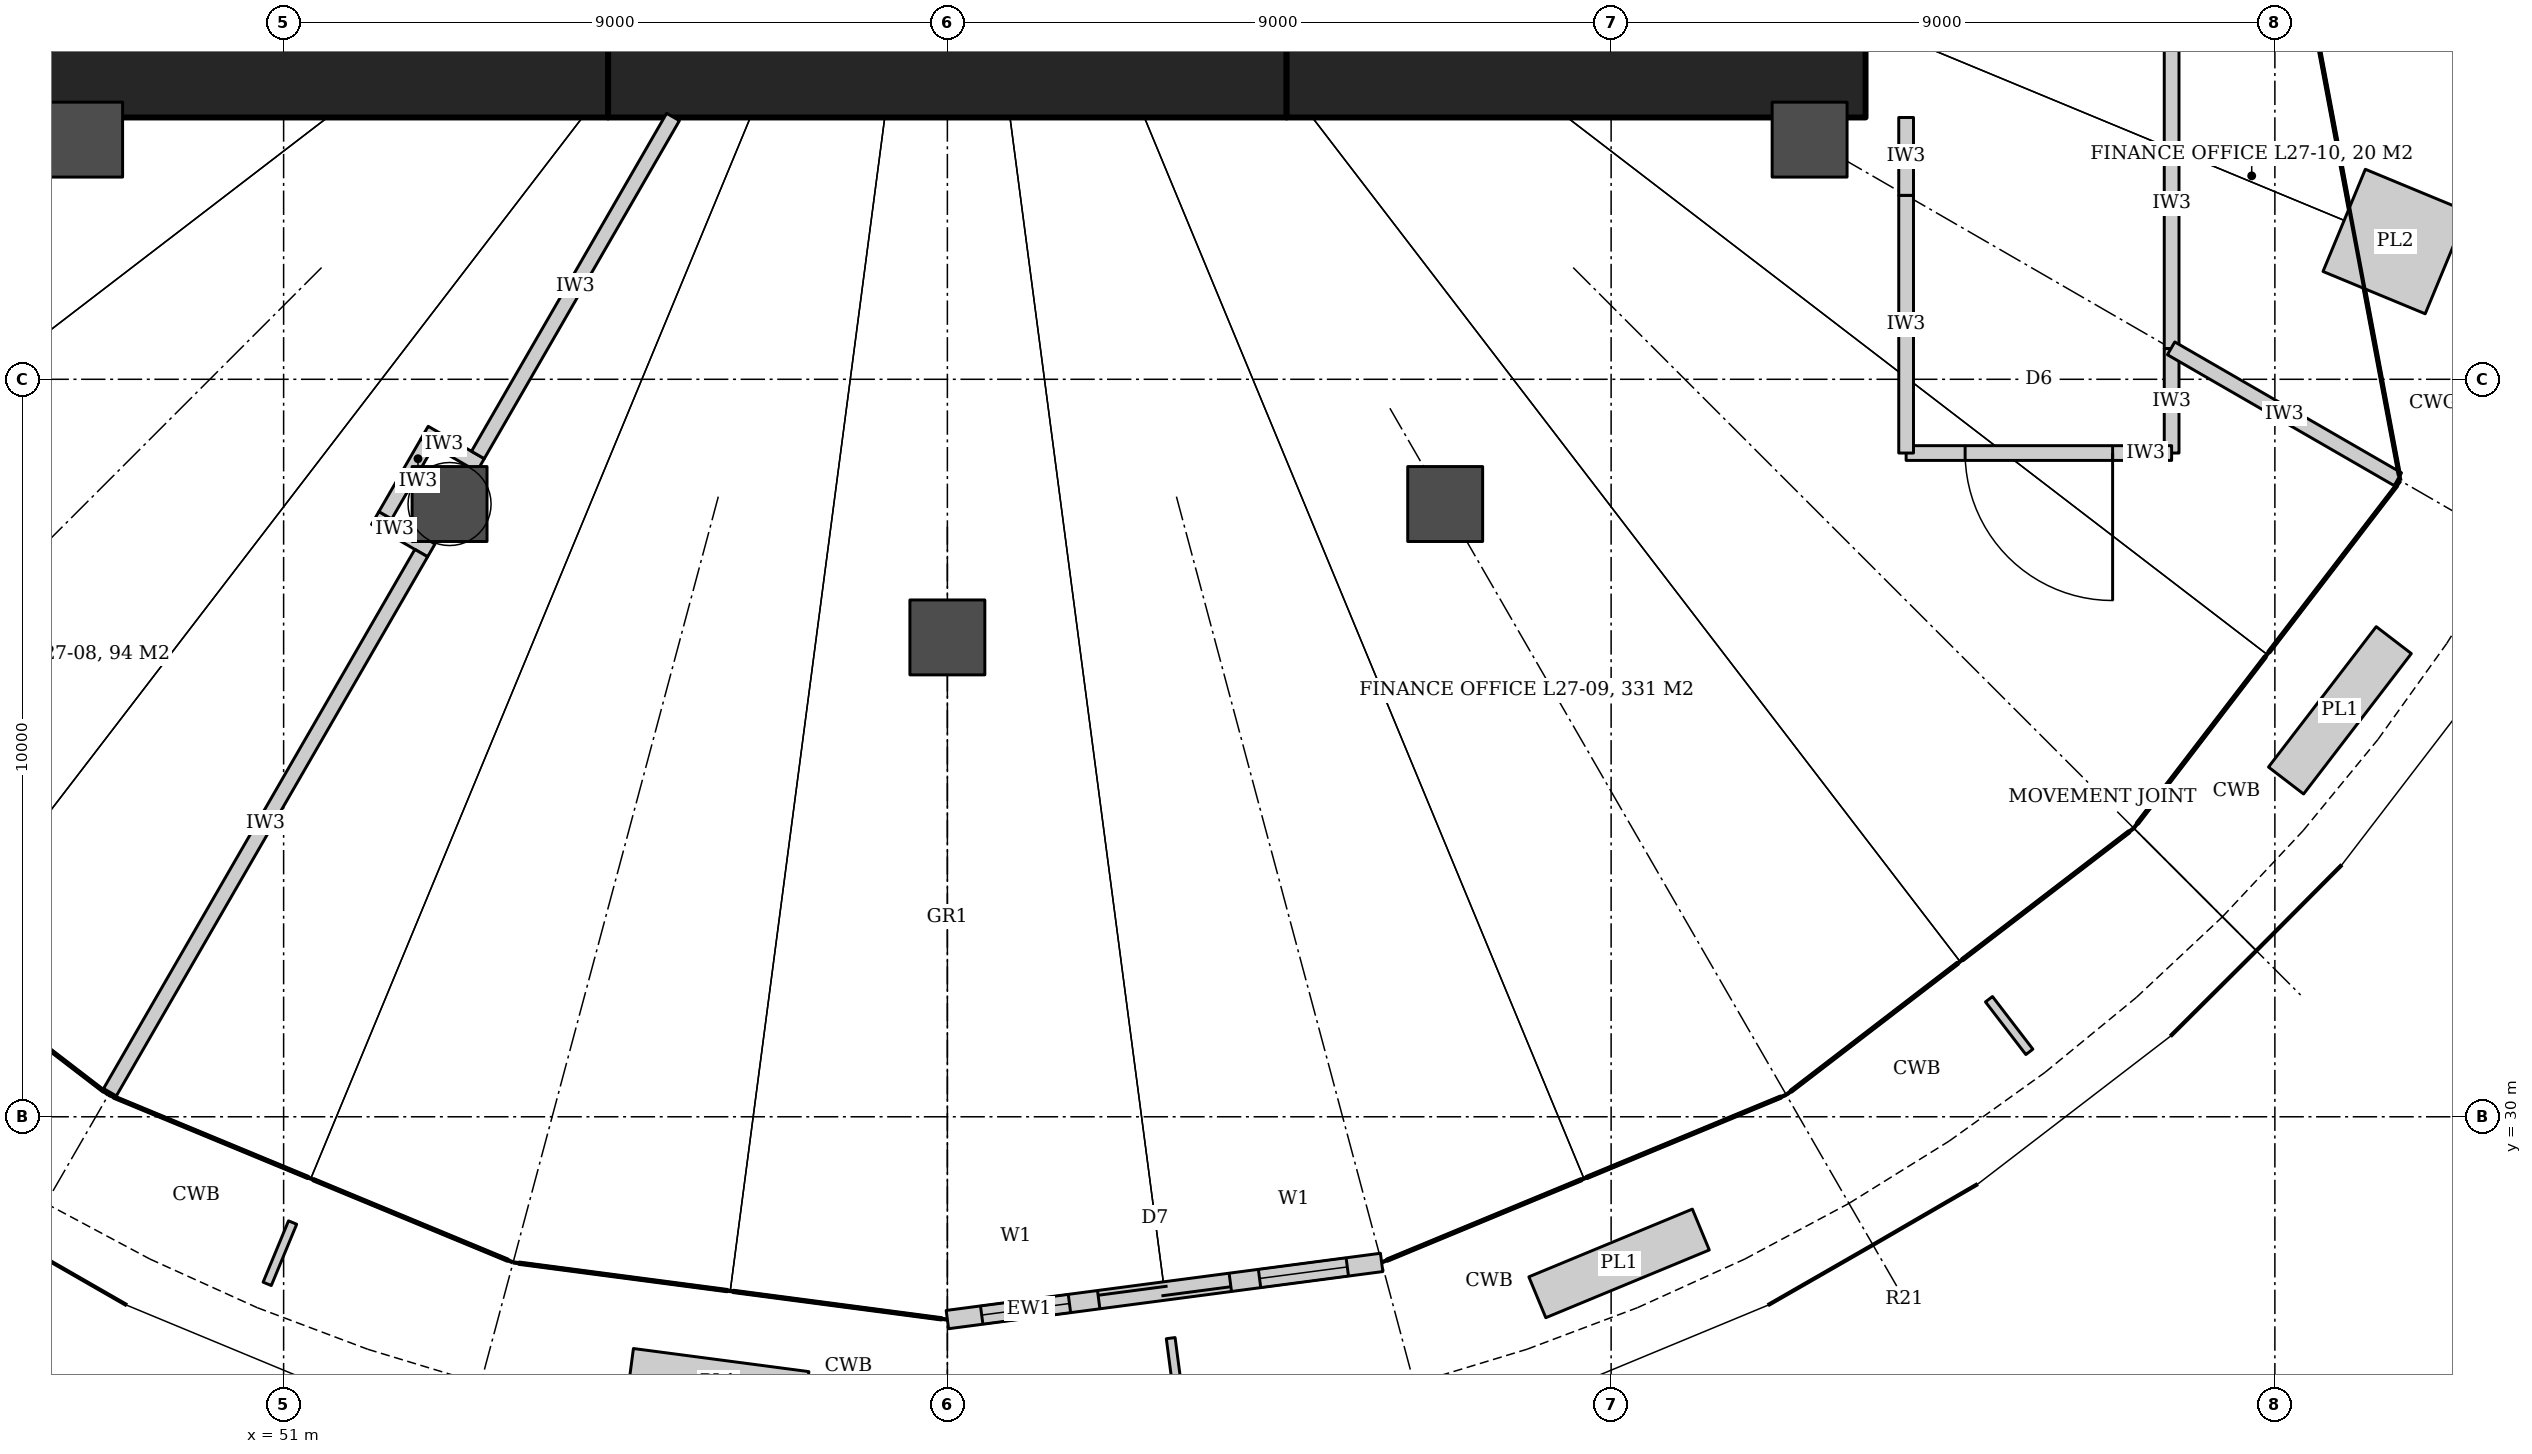
"""IFC4 building model, lengths in metres.
Left out: names, types, materials, properties, quantities, classifications, styles, units other than length and angle.
Written with IfcOpenShell. Run it as: python <this file> out.ifc"""

import sys

from ifc_helpers import new_model, si_unit, direction, frame, frame_2d, origin, origin_2d, place, context, subcontext, project, spatial, rectangle, hollow_circle, extrude, element, fill, save


model = new_model("IFC4")
c1 = context("Model", 3, precision=1e-05, world=origin(), true_north=direction((0.0, 1.0)))
c2 = subcontext(c1, "Body", "Model", "MODEL_VIEW")
j1 = project(units=[si_unit("LENGTHUNIT", "METRE"), si_unit("PLANEANGLEUNIT", "RADIAN")], contexts=[c1])
p1 = place(None, origin())
s1 = spatial("IfcSite", under=j1, at=p1, CompositionType="ELEMENT")
p2 = place(p1, origin())
s2 = spatial("IfcBuilding", under=s1, at=p2, CompositionType="ELEMENT")
p3 = place(p2, frame((0.0, 0.0, 122.6)))
s3 = spatial("IfcBuildingStorey", under=s2, at=p3, CompositionType="ELEMENT", Elevation=122.6)
p4 = place(p3, frame((47.55, 44.45, 0.0), z_axis=(0.0, 0.0, 1.0), x_axis=(1.0, 0.0, 0.0)))
e1 = element("IfcWall", 1, at=p4, inside=s3, PredefinedType="SHEAR", context=c2, shape_type="SweptSolid", body=[
    extrude(rectangle(XDim=7.85, YDim=1.8, at=frame_2d((3.925, 0.0))), origin(), (0.0, 0.0, 1.0), 4.2),
])
p5 = place(p3, frame((55.4, 44.45, 0.0), z_axis=(0.0, 0.0, 1.0), x_axis=(1.0, 0.0, 0.0)))
e2 = element("IfcWall", 2, at=p5, inside=s3, PredefinedType="SHEAR", context=c2, shape_type="SweptSolid", body=[
    extrude(rectangle(XDim=9.2, YDim=1.8, at=frame_2d((4.6, 0.0))), origin(), (0.0, 0.0, 1.0), 4.2),
])
p6 = place(p3, frame((64.6, 44.45, 0.0), z_axis=(0.0, 0.0, 1.0), x_axis=(1.0, 0.0, 0.0)))
e3 = element("IfcWall", 3, at=p6, inside=s3, PredefinedType="SHEAR", context=c2, shape_type="SweptSolid", body=[
    extrude(rectangle(XDim=7.85, YDim=1.8, at=frame_2d((3.925, 0.0))), origin(), (0.0, 0.0, 1.0), 4.2),
])
for number, where, z_axis, x_axis in (
    (4, (48.309, 43.25, 0.0), (0.0, 0.0, 1.0), (1.0, 0.0, 0.0)),
    (5, (53.25, 38.309, 0.0), (0.0, 0.0, 1.0), (1.0, 0.0, 0.0)),
    (6, (60.0, 36.5, 0.0), (0.0, 0.0, 1.0), (1.0, 0.0, 0.0)),
    (7, (66.75, 38.309, 0.0), (0.0, 0.0, 1.0), (1.0, 0.0, 0.0)),
    (8, (71.691, 43.25, 0.0), (0.0, 0.0, 1.0), (1.0, 0.0, 0.0)),
):
    element("IfcColumn", number, at=place(p3, frame(where, z_axis=z_axis, x_axis=x_axis)), inside=s3, PredefinedType="COLUMN", context=c2, shape_type="SweptSolid", body=[
        extrude(hollow_circle(Radius=0.508, WallThickness=0.05, at=origin_2d()), origin(), (0.0, 0.0, 1.0), 4.2),
    ])
p7 = place(p3, frame((76.6, 50.0, 0.0), z_axis=(0.0, 0.0, 1.0), x_axis=(0.0, -1.0, 0.0)))
e9 = element("IfcWall", 9, at=p7, inside=s3, PredefinedType="PARTITIONING", context=c2, shape_type="SweptSolid", body=[
    extrude(rectangle(XDim=9.584, YDim=0.2, at=frame_2d((4.792, 0.0))), origin(), (0.0, 0.0, 1.0), 3.04),
])
p8 = place(p7, frame((4.292, 0.0, 0.0)))
e10 = element("IfcOpeningElement", 10, at=p8, cuts=e9, PredefinedType="OPENING", context=c2, shape_type="SweptSolid", body=[
    extrude(rectangle(XDim=1.0, YDim=2.1, at=frame_2d((0.5, 1.05))), frame((0.0, 0.11, 0.0), z_axis=(0.0, -1.0, 0.0), x_axis=(1.0, 0.0, 0.0)), (0.0, 0.0, 1.0), 0.22),
])
p9 = place(p3, frame((76.6, 40.416, 0.0), z_axis=(0.0, 0.0, 1.0), x_axis=(0.0, -1.0, 0.0)))
e11 = element("IfcWall", 11, at=p9, inside=s3, PredefinedType="PARTITIONING", context=c2, shape_type="SweptSolid", body=[
    extrude(rectangle(XDim=1.416, YDim=0.2, at=frame_2d((0.708, 0.0))), origin(), (0.0, 0.0, 1.0), 3.04),
])
p10 = place(p3, frame((76.6, 39.0, 0.0), z_axis=(0.0, 0.0, 1.0), x_axis=(-1.0, 0.0, 0.0)))
e12 = element("IfcWall", 12, at=p10, inside=s3, PredefinedType="PARTITIONING", context=c2, shape_type="SweptSolid", body=[
    extrude(rectangle(XDim=3.6, YDim=0.2, at=frame_2d((1.8, 0.0))), origin(), (0.0, 0.0, 1.0), 3.04),
])
p11 = place(p10, frame((0.8, 0.0, 0.0)))
e13 = element("IfcOpeningElement", 13, at=p11, cuts=e12, PredefinedType="OPENING", context=c2, shape_type="SweptSolid", body=[
    extrude(rectangle(XDim=2.0, YDim=2.1, at=frame_2d((1.0, 1.05))), frame((0.0, 0.11, 0.0), z_axis=(0.0, -1.0, 0.0), x_axis=(1.0, 0.0, 0.0)), (0.0, 0.0, 1.0), 0.22),
])
p12 = place(p3, frame((73.0, 39.0, 0.0), z_axis=(0.0, 0.0, 1.0), x_axis=(0.0, 1.0, 0.0)))
e14 = element("IfcWall", 14, at=p12, inside=s3, PredefinedType="PARTITIONING", context=c2, shape_type="SweptSolid", body=[
    extrude(rectangle(XDim=3.494, YDim=0.2, at=frame_2d((1.747, 0.0))), origin(), (0.0, 0.0, 1.0), 3.04),
])
p13 = place(p3, frame((73.0, 42.494, 0.0), z_axis=(0.0, 0.0, 1.0), x_axis=(0.0, 1.0, 0.0)))
e15 = element("IfcWall", 15, at=p13, inside=s3, PredefinedType="PARTITIONING", context=c2, shape_type="SweptSolid", body=[
    extrude(rectangle(XDim=1.056, YDim=0.2, at=frame_2d((0.528, 0.0))), origin(), (0.0, 0.0, 1.0), 3.04),
])
for number, where, z_axis, x_axis in (
    (16, (53.671, 38.837, 0.0), (0.0, 0.0, 1.0), (-0.866, 0.5, 0.0)),
    (17, (53.003, 37.68, 0.0), (0.0, 0.0, 1.0), (-0.866, 0.5, 0.0)),
):
    element("IfcWall", number, at=place(p3, frame(where, z_axis=z_axis, x_axis=x_axis)), inside=s3, PredefinedType="PARTITIONING", context=c2, shape_type="SweptSolid", body=[
        extrude(rectangle(XDim=0.878, YDim=0.2, at=frame_2d((0.439, 0.0))), origin(), (0.0, 0.0, 1.0), 3.02),
    ])
p14 = place(p3, frame((52.947, 39.14, 0.0), z_axis=(0.0, 0.0, 1.0), x_axis=(-0.499883687939, -0.866092546171, 0.0)))
e18 = element("IfcWall", 18, at=p14, inside=s3, PredefinedType="PARTITIONING", context=c2, shape_type="SweptSolid", body=[
    extrude(rectangle(XDim=1.136, YDim=0.2, at=frame_2d((0.568, 0.0))), origin(), (0.0, 0.0, 1.0), 3.02),
])
p15 = place(p3, frame((56.28, 43.557, 0.0), z_axis=(0.0, 0.0, 1.0), x_axis=(-0.49999933383, -0.866025788398, 0.0)))
e19 = element("IfcWall", 19, at=p15, inside=s3, PredefinedType="PARTITIONING", context=c2, shape_type="SweptSolid", body=[
    extrude(rectangle(XDim=5.292, YDim=0.2, at=frame_2d((2.646, 0.0))), origin(), (0.0, 0.0, 1.0), 3.04),
])
p16 = place(p3, frame((52.866, 37.644, 0.0), z_axis=(0.0, 0.0, 1.0), x_axis=(-0.49999281717, -0.866029550753, 0.0)))
e20 = element("IfcWall", 20, at=p16, inside=s3, PredefinedType="PARTITIONING", context=c2, shape_type="SweptSolid", body=[
    extrude(rectangle(XDim=8.442, YDim=0.2, at=frame_2d((4.221, 0.0))), origin(), (0.0, 0.0, 1.0), 3.04),
])
p17 = place(p3, frame((76.593, 40.42, 0.0), z_axis=(0.0, 0.0, 1.0), x_axis=(0.8660424351, -0.499970499736, 0.0)))
e21 = element("IfcWall", 21, at=p17, inside=s3, PredefinedType="PARTITIONING", context=c2, shape_type="SweptSolid", body=[
    extrude(rectangle(XDim=3.55, YDim=0.2, at=frame_2d((1.775, 0.0))), origin(), (0.0, 0.0, 1.0), 3.04),
])
p18 = place(p3, frame((60.0, 27.25, 0.0), z_axis=(0.0, 0.0, 1.0), x_axis=(0.991445898364, 0.130518315254, 0.0)))
e22 = element("IfcWall", 22, at=p18, inside=s3, PredefinedType="SOLIDWALL", context=c2, shape_type="SweptSolid", body=[
    extrude(rectangle(XDim=5.939, YDim=0.25, at=frame_2d((2.969, 0.0))), origin(), (0.0, 0.0, 1.0), 4.04),
])
p19 = place(p18, frame((2.07, 0.0, 0.0)))
e23 = element("IfcOpeningElement", 23, at=p19, cuts=e22, PredefinedType="OPENING", context=c2, shape_type="SweptSolid", body=[
    extrude(rectangle(XDim=1.8, YDim=2.4, at=frame_2d((0.9, 1.2))), frame((0.0, 0.135, 0.0), z_axis=(0.0, -1.0, 0.0), x_axis=(1.0, 0.0, 0.0)), (0.0, 0.0, 1.0), 0.27),
])
p20 = place(p18, frame((0.469, 0.0, 0.0)))
e24 = element("IfcOpeningElement", 24, at=p20, cuts=e22, PredefinedType="OPENING", context=c2, shape_type="SweptSolid", body=[
    extrude(rectangle(XDim=1.2, YDim=2.4, at=frame_2d((0.6, 1.2))), frame((0.0, 0.135, 0.0), z_axis=(0.0, -1.0, 0.0), x_axis=(1.0, 0.0, 0.0)), (0.0, 0.0, 1.0), 0.27),
])
p21 = place(p18, frame((4.27, 0.0, 0.0)))
e25 = element("IfcOpeningElement", 25, at=p21, cuts=e22, PredefinedType="OPENING", context=c2, shape_type="SweptSolid", body=[
    extrude(rectangle(XDim=1.2, YDim=2.4, at=frame_2d((0.6, 1.2))), frame((0.0, 0.135, 0.0), z_axis=(0.0, -1.0, 0.0), x_axis=(1.0, 0.0, 0.0)), (0.0, 0.0, 1.0), 0.27),
])
p22 = place(p11, origin())
e26 = element("IfcDoor", 26, at=p22, inside=s3, OperationType="DOUBLE_DOOR_DOUBLE_SWING", PredefinedType="DOOR", context=c2, shape_type="SweptSolid", body=[
    extrude(rectangle(XDim=2.0, YDim=2.1, at=frame_2d((1.0, 1.05))), frame((0.0, 0.025, 0.0), z_axis=(0.0, -1.0, 0.0), x_axis=(1.0, 0.0, 0.0)), (0.0, 0.0, 1.0), 0.05),
])
fill(e13, e26)
p23 = place(p19, origin())
e27 = element("IfcDoor", 27, at=p23, inside=s3, OperationType="DOUBLE_DOOR_SLIDING", PredefinedType="DOOR", context=c2, shape_type="SweptSolid", body=[
    extrude(rectangle(XDim=1.8, YDim=2.4, at=frame_2d((0.9, 1.2))), frame((0.0, 0.025, 0.0), z_axis=(0.0, -1.0, 0.0), x_axis=(1.0, 0.0, 0.0)), (0.0, 0.0, 1.0), 0.05),
])
fill(e23, e27)
p24 = place(p20, origin())
e28 = element("IfcWindow", 28, at=p24, inside=s3, PartitioningType="SINGLE_PANEL", PredefinedType="WINDOW", context=c2, shape_type="SweptSolid", body=[
    extrude(rectangle(XDim=1.2, YDim=2.4, at=frame_2d((0.6, 1.2))), frame((0.0, 0.03, 0.0), z_axis=(0.0, -1.0, 0.0), x_axis=(1.0, 0.0, 0.0)), (0.0, 0.0, 1.0), 0.06),
])
fill(e24, e28)
p25 = place(p21, origin())
e29 = element("IfcWindow", 29, at=p25, inside=s3, PartitioningType="SINGLE_PANEL", PredefinedType="WINDOW", context=c2, shape_type="SweptSolid", body=[
    extrude(rectangle(XDim=1.2, YDim=2.4, at=frame_2d((0.6, 1.2))), frame((0.0, 0.03, 0.0), z_axis=(0.0, -1.0, 0.0), x_axis=(1.0, 0.0, 0.0)), (0.0, 0.0, 1.0), 0.06),
])
fill(e25, e29)
save(model, sys.argv[1])
